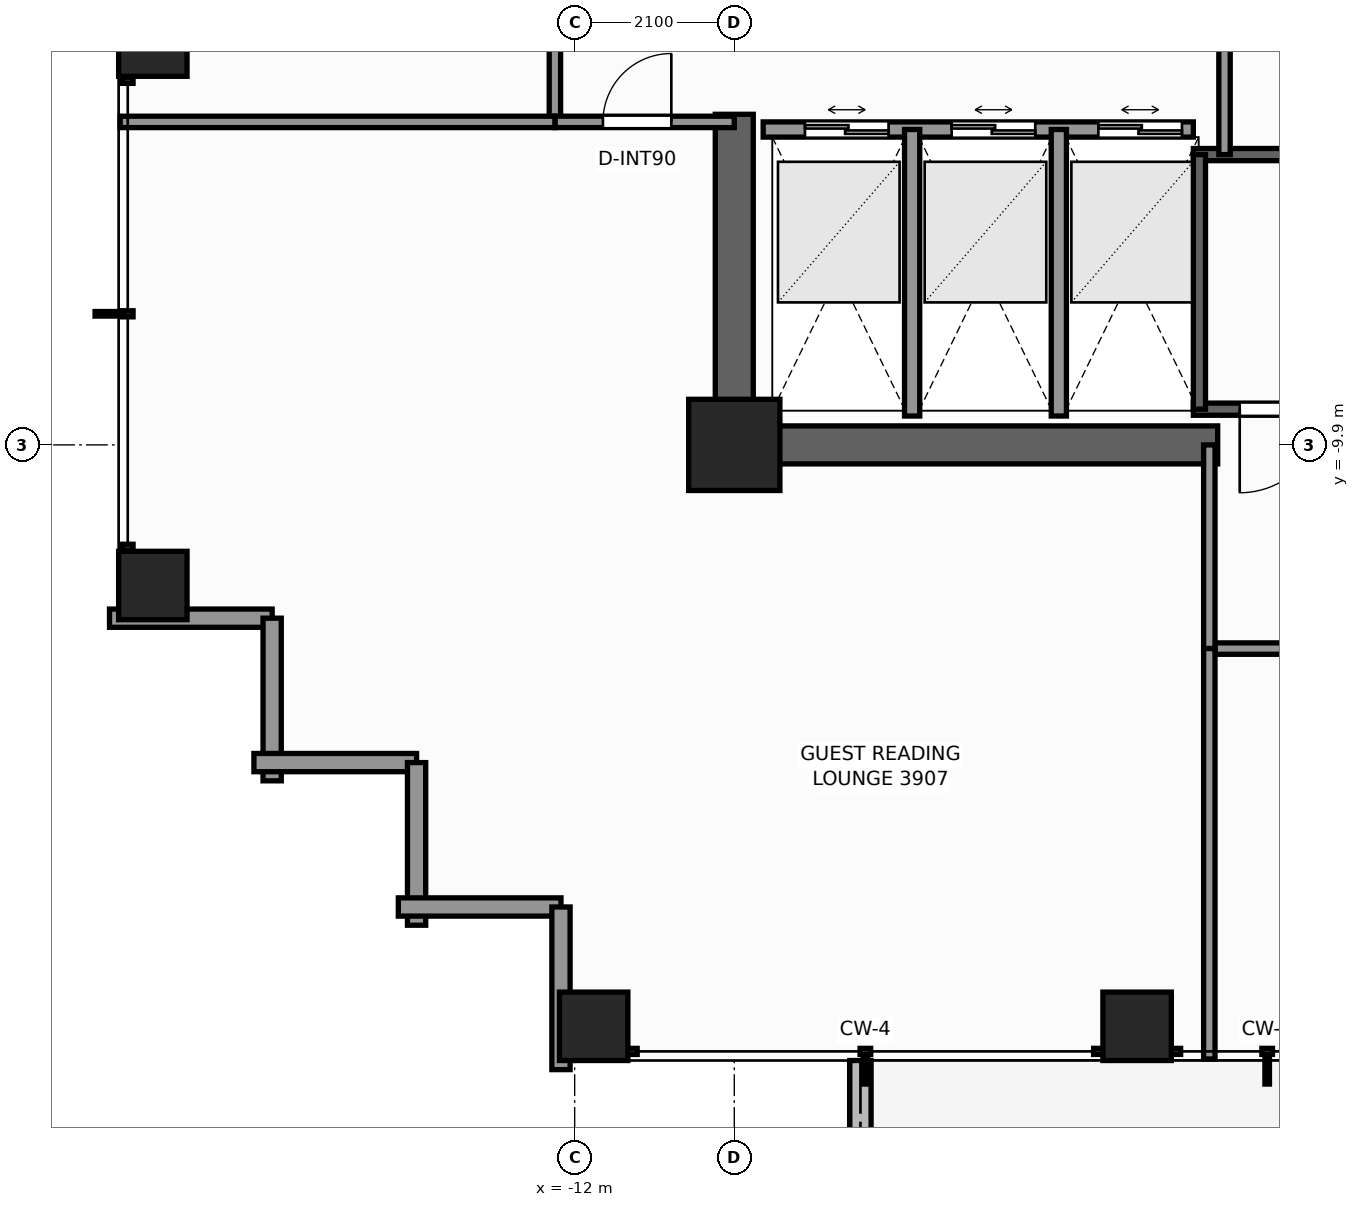
"""IFC4 building model, lengths in metres.
Left out: names, types, materials, properties, quantities, classifications, styles, units other than length and angle.
Written with IfcOpenShell. Run it as: python <this file> out.ifc"""

import sys

from ifc_helpers import new_model, si_unit, direction, frame, frame_2d, origin, origin_2d, place, context, subcontext, project, spatial, rectangle, extrude, element, fill, save


model = new_model("IFC4")
c1 = context("Model", 3, precision=1e-05, world=origin(), true_north=direction((0.0, 1.0)))
c2 = subcontext(c1, "Body", "Model", "MODEL_VIEW")
j1 = project(units=[si_unit("LENGTHUNIT", "METRE"), si_unit("PLANEANGLEUNIT", "RADIAN")], contexts=[c1])
p1 = place(None, origin())
s1 = spatial("IfcSite", under=j1, at=p1, CompositionType="ELEMENT")
p2 = place(p1, origin())
s2 = spatial("IfcBuilding", under=s1, at=p2, CompositionType="ELEMENT")
p3 = place(p2, frame((0.0, 0.0, 134.9)))
s3 = spatial("IfcBuildingStorey", under=s2, at=p3, CompositionType="ELEMENT", Elevation=134.9)
p4 = place(p3, frame((-3.54, -9.9, 0.0), z_axis=(0.0, 0.0, 1.0), x_axis=(-1.0, 0.0, 0.0)))
e1 = element("IfcWall", 1, at=p4, inside=s3, PredefinedType="SHEAR", context=c2, shape_type="SweptSolid", body=[
    extrude(rectangle(XDim=6.61, YDim=0.5, at=frame_2d((3.305, 0.0))), origin(), (0.0, 0.0, 1.0), 3.3),
])
p5 = place(p3, frame((-9.9, -9.65, 0.0), z_axis=(0.0, 0.0, 1.0), x_axis=(0.0, 1.0, 0.0)))
e2 = element("IfcWall", 2, at=p5, inside=s3, PredefinedType="SHEAR", context=c2, shape_type="SweptSolid", body=[
    extrude(rectangle(XDim=4.1, YDim=0.5, at=frame_2d((2.05, 0.0))), origin(), (0.0, 0.0, 1.0), 3.3),
])
p6 = place(p3, frame((-9.9, -9.9, 0.0), z_axis=(0.0, 0.0, 1.0), x_axis=(1.0, 0.0, 0.0)))
e3 = element("IfcColumn", 3, at=p6, inside=s3, PredefinedType="COLUMN", context=c2, shape_type="SweptSolid", body=[
    extrude(rectangle(XDim=1.2, YDim=1.2, at=origin_2d()), origin(), (0.0, 0.0, 1.0), 3.3),
])
for number, where, z_axis, x_axis in (
    (4, (-11.75, -17.55, 0.0), (0.0, 0.0, 1.0), (1.0, 0.0, 0.0)),
    (5, (-4.6, -17.55, 0.0), (0.0, 0.0, 1.0), (1.0, 0.0, 0.0)),
    (6, (-17.55, -11.75, 0.0), (0.0, 0.0, 1.0), (1.0, 0.0, 0.0)),
    (7, (-17.55, -4.6, 0.0), (0.0, 0.0, 1.0), (1.0, 0.0, 0.0)),
):
    element("IfcColumn", number, at=place(p3, frame(where, z_axis=z_axis, x_axis=x_axis)), inside=s3, PredefinedType="COLUMN", context=c2, shape_type="SweptSolid", body=[
        extrude(rectangle(XDim=0.9, YDim=0.9, at=origin_2d()), origin(), (0.0, 0.0, 1.0), 3.3),
    ])
p7 = place(p3, frame((-8.24, -18.0, -0.02), z_axis=(0.0, 0.0, 1.0), x_axis=(0.0, -1.0, 0.0)))
e8 = element("IfcWall", 8, at=p7, inside=s3, PredefinedType="PARAPET", context=c2, shape_type="SweptSolid", body=[
    extrude(rectangle(XDim=1.466, YDim=0.28, at=frame_2d((0.733, 0.0))), origin(), (0.0, 0.0, 1.0), 0.42),
])
for number, where, z_axis, x_axis in (
    (9, (-15.98, -12.18, 0.0), (0.0, 0.0, 1.0), (-1.0, 0.0, 0.0)),
    (10, (-15.98, -14.32, 0.0), (0.0, 0.0, 1.0), (0.0, 1.0, 0.0)),
):
    element("IfcWall", number, at=place(p3, frame(where, z_axis=z_axis, x_axis=x_axis)), inside=s3, PredefinedType="STANDARD", context=c2, shape_type="SweptSolid", body=[
        extrude(rectangle(XDim=2.14, YDim=0.24, at=frame_2d((1.07, 0.0))), origin(), (0.0, 0.0, 1.0), 2.479),
    ])
for number, where, z_axis, x_axis in (
    (11, (-14.08, -14.08, 0.0), (0.0, 0.0, 1.0), (-1.0, 0.0, 0.0)),
    (12, (-14.08, -16.22, 0.0), (0.0, 0.0, 1.0), (0.0, 1.0, 0.0)),
):
    element("IfcWall", number, at=place(p3, frame(where, z_axis=z_axis, x_axis=x_axis)), inside=s3, PredefinedType="STANDARD", context=c2, shape_type="SweptSolid", body=[
        extrude(rectangle(XDim=2.14, YDim=0.24, at=frame_2d((1.07, 0.0))), origin(), (0.0, 0.0, 1.0), 2.479),
    ])
for number, where, z_axis, x_axis in (
    (13, (-12.18, -15.98, 0.0), (0.0, 0.0, 1.0), (-1.0, 0.0, 0.0)),
    (14, (-12.18, -18.12, 0.0), (0.0, 0.0, 1.0), (0.0, 1.0, 0.0)),
):
    element("IfcWall", number, at=place(p3, frame(where, z_axis=z_axis, x_axis=x_axis)), inside=s3, PredefinedType="STANDARD", context=c2, shape_type="SweptSolid", body=[
        extrude(rectangle(XDim=2.14, YDim=0.24, at=frame_2d((1.07, 0.0))), origin(), (0.0, 0.0, 1.0), 2.479),
    ])
p8 = place(p3, frame((3.86, -9.43, 0.0), z_axis=(0.0, 0.0, 1.0), x_axis=(-1.0, 0.0, 0.0)))
e15 = element("IfcWall", 15, at=p8, inside=s3, PredefinedType="SHEAR", context=c2, shape_type="SweptSolid", body=[
    extrude(rectangle(XDim=7.72, YDim=0.16, at=frame_2d((3.86, 0.0))), origin(), (0.0, 0.0, 1.0), 3.3),
])
p9 = place(p8, frame((6.01, 0.0, 0.0)))
e16 = element("IfcOpeningElement", 16, at=p9, cuts=e15, PredefinedType="OPENING", context=c2, shape_type="SweptSolid", body=[
    extrude(rectangle(XDim=1.1, YDim=2.2, at=frame_2d((0.55, 1.1))), frame((0.0, 0.09, 0.0), z_axis=(0.0, -1.0, 0.0), x_axis=(1.0, 0.0, 0.0)), (0.0, 0.0, 1.0), 0.18),
])
p10 = place(p3, frame((-3.86, -6.08, 0.0), z_axis=(0.0, 0.0, 1.0), x_axis=(1.0, 0.0, 0.0)))
e17 = element("IfcWall", 17, at=p10, inside=s3, PredefinedType="SHEAR", context=c2, shape_type="SweptSolid", body=[
    extrude(rectangle(XDim=7.72, YDim=0.16, at=frame_2d((3.86, 0.0))), origin(), (0.0, 0.0, 1.0), 3.3),
])
p11 = place(p3, frame((-3.78, -9.43, 0.0), z_axis=(0.0, 0.0, 1.0), x_axis=(0.0, 1.0, 0.0)))
e18 = element("IfcWall", 18, at=p11, inside=s3, PredefinedType="SHEAR", context=c2, shape_type="SweptSolid", body=[
    extrude(rectangle(XDim=3.35, YDim=0.16, at=frame_2d((1.675, 0.0))), origin(), (0.0, 0.0, 1.0), 3.3),
])
p12 = place(p3, frame((-9.52, -5.75, 0.0), z_axis=(0.0, 0.0, 1.0), x_axis=(1.0, 0.0, 0.0)))
e19 = element("IfcWall", 19, at=p12, inside=s3, PredefinedType="SOLIDWALL", context=c2, shape_type="SweptSolid", body=[
    extrude(rectangle(XDim=5.66, YDim=0.2, at=frame_2d((2.83, 0.0))), origin(), (0.0, 0.0, 1.0), 3.1),
])
p13 = place(p12, frame((0.55, 0.0, 0.0)))
e20 = element("IfcOpeningElement", 20, at=p13, cuts=e19, PredefinedType="OPENING", context=c2, shape_type="SweptSolid", body=[
    extrude(rectangle(XDim=1.1, YDim=2.2, at=frame_2d((0.55, 1.1))), frame((0.0, 0.11, 0.0), z_axis=(0.0, -1.0, 0.0), x_axis=(1.0, 0.0, 0.0)), (0.0, 0.0, 1.0), 0.22),
])
p14 = place(p12, frame((2.48, 0.0, 0.0)))
e21 = element("IfcOpeningElement", 21, at=p14, cuts=e19, PredefinedType="OPENING", context=c2, shape_type="SweptSolid", body=[
    extrude(rectangle(XDim=1.1, YDim=2.2, at=frame_2d((0.55, 1.1))), frame((0.0, 0.11, 0.0), z_axis=(0.0, -1.0, 0.0), x_axis=(1.0, 0.0, 0.0)), (0.0, 0.0, 1.0), 0.22),
])
p15 = place(p12, frame((4.41, 0.0, 0.0)))
e22 = element("IfcOpeningElement", 22, at=p15, cuts=e19, PredefinedType="OPENING", context=c2, shape_type="SweptSolid", body=[
    extrude(rectangle(XDim=1.1, YDim=2.2, at=frame_2d((0.55, 1.1))), frame((0.0, 0.11, 0.0), z_axis=(0.0, -1.0, 0.0), x_axis=(1.0, 0.0, 0.0)), (0.0, 0.0, 1.0), 0.22),
])
for number, where, z_axis, x_axis in (
    (23, (-7.56, -9.52, 0.0), (0.0, 0.0, 1.0), (0.0, 1.0, 0.0)),
    (24, (-5.63, -9.52, 0.0), (0.0, 0.0, 1.0), (0.0, 1.0, 0.0)),
):
    element("IfcWall", number, at=place(p3, frame(where, z_axis=z_axis, x_axis=x_axis)), inside=s3, PredefinedType="SOLIDWALL", context=c2, shape_type="SweptSolid", body=[
        extrude(rectangle(XDim=3.77, YDim=0.2, at=frame_2d((1.885, 0.0))), origin(), (0.0, 0.0, 1.0), 3.1),
    ])
p16 = place(p3, frame((-3.45, -6.08, 0.0), z_axis=(0.0, 0.0, 1.0), x_axis=(0.0, 1.0, 0.0)))
e25 = element("IfcWall", 25, at=p16, inside=s3, PredefinedType="PARTITIONING", context=c2, shape_type="SweptSolid", body=[
    extrude(rectangle(XDim=2.36, YDim=0.15, at=frame_2d((1.18, 0.0))), origin(), (0.0, 0.0, 1.0), 3.1),
])
p17 = place(p3, frame((-3.65, -12.58, 0.0), z_axis=(0.0, 0.0, 1.0), x_axis=(1.0, 0.0, 0.0)))
e26 = element("IfcWall", 26, at=p17, inside=s3, PredefinedType="PARTITIONING", context=c2, shape_type="SweptSolid", body=[
    extrude(rectangle(XDim=16.07, YDim=0.15, at=frame_2d((8.035, 0.0))), origin(), (0.0, 0.0, 1.0), 2.312),
])
p18 = place(p17, frame((10.735, 0.0, 0.0)))
e27 = element("IfcOpeningElement", 27, at=p18, cuts=e26, PredefinedType="OPENING", context=c2, shape_type="SweptSolid", body=[
    extrude(rectangle(XDim=0.9, YDim=2.06, at=frame_2d((0.45, 1.03))), frame((0.0, 0.085, 0.0), z_axis=(0.0, -1.0, 0.0), x_axis=(1.0, 0.0, 0.0)), (0.0, 0.0, 1.0), 0.17),
])
p19 = place(p3, frame((-3.65, -12.58, 0.0), z_axis=(0.0, 0.0, 1.0), x_axis=(0.0, 1.0, 0.0)))
e28 = element("IfcWall", 28, at=p19, inside=s3, PredefinedType="PARTITIONING", context=c2, shape_type="SweptSolid", body=[
    extrude(rectangle(XDim=2.68, YDim=0.15, at=frame_2d((1.34, 0.0))), origin(), (0.0, 0.0, 1.0), 3.1),
])
p20 = place(p3, frame((-12.26, -5.65, 0.0), z_axis=(0.0, 0.0, 1.0), x_axis=(0.0, 1.0, 0.0)))
e29 = element("IfcWall", 29, at=p20, inside=s3, PredefinedType="PARTITIONING", context=c2, shape_type="SweptSolid", body=[
    extrude(rectangle(XDim=3.6, YDim=0.15, at=frame_2d((1.8, 0.0))), origin(), (0.0, 0.0, 1.0), 2.312),
])
p21 = place(p20, frame((2.156, 0.0, 0.0)))
e30 = element("IfcOpeningElement", 30, at=p21, cuts=e29, PredefinedType="OPENING", context=c2, shape_type="SweptSolid", body=[
    extrude(rectangle(XDim=0.9, YDim=2.06, at=frame_2d((0.45, 1.03))), frame((0.0, 0.085, 0.0), z_axis=(0.0, -1.0, 0.0), x_axis=(1.0, 0.0, 0.0)), (0.0, 0.0, 1.0), 0.17),
])
p22 = place(p3, frame((-12.26, -5.65, 0.0), z_axis=(0.0, 0.0, 1.0), x_axis=(1.0, 0.0, 0.0)))
e31 = element("IfcWall", 31, at=p22, inside=s3, PredefinedType="PARTITIONING", context=c2, shape_type="SweptSolid", body=[
    extrude(rectangle(XDim=2.36, YDim=0.15, at=frame_2d((1.18, 0.0))), origin(), (0.0, 0.0, 1.0), 3.1),
])
p23 = place(p22, frame((0.632, 0.0, 0.0)))
e32 = element("IfcOpeningElement", 32, at=p23, cuts=e31, PredefinedType="OPENING", context=c2, shape_type="SweptSolid", body=[
    extrude(rectangle(XDim=0.9, YDim=2.06, at=frame_2d((0.45, 1.03))), frame((0.0, 0.085, 0.0), z_axis=(0.0, -1.0, 0.0), x_axis=(1.0, 0.0, 0.0)), (0.0, 0.0, 1.0), 0.17),
])
p24 = place(p3, frame((-17.98, -5.65, 0.0), z_axis=(0.0, 0.0, 1.0), x_axis=(1.0, 0.0, 0.0)))
e33 = element("IfcWall", 33, at=p24, inside=s3, PredefinedType="PARTITIONING", context=c2, shape_type="SweptSolid", body=[
    extrude(rectangle(XDim=5.72, YDim=0.15, at=frame_2d((2.86, 0.0))), origin(), (0.0, 0.0, 1.0), 2.469),
])
p25 = place(p3, frame((-3.65, -17.98, 0.0), z_axis=(0.0, 0.0, 1.0), x_axis=(0.0, 1.0, 0.0)))
e34 = element("IfcWall", 34, at=p25, inside=s3, PredefinedType="PARTITIONING", context=c2, shape_type="SweptSolid", body=[
    extrude(rectangle(XDim=5.4, YDim=0.15, at=frame_2d((2.7, 0.0))), origin(), (0.0, 0.0, 1.0), 2.469),
])
p26 = place(p9, origin())
e35 = element("IfcDoor", 35, at=p26, inside=s3, OperationType="SINGLE_SWING_RIGHT", PredefinedType="DOOR", context=c2, shape_type="SweptSolid", body=[
    extrude(rectangle(XDim=1.1, YDim=2.2, at=frame_2d((0.55, 1.1))), frame((0.0, 0.025, 0.0), z_axis=(0.0, -1.0, 0.0), x_axis=(1.0, 0.0, 0.0)), (0.0, 0.0, 1.0), 0.05),
])
fill(e16, e35)
p27 = place(p13, origin())
e36 = element("IfcDoor", 36, at=p27, inside=s3, OperationType="DOUBLE_DOOR_SLIDING", PredefinedType="DOOR", context=c2, shape_type="SweptSolid", body=[
    extrude(rectangle(XDim=1.1, YDim=2.2, at=frame_2d((0.55, 1.1))), frame((0.0, 0.025, 0.0), z_axis=(0.0, -1.0, 0.0), x_axis=(1.0, 0.0, 0.0)), (0.0, 0.0, 1.0), 0.05),
])
fill(e20, e36)
p28 = place(p14, origin())
e37 = element("IfcDoor", 37, at=p28, inside=s3, OperationType="DOUBLE_DOOR_SLIDING", PredefinedType="DOOR", context=c2, shape_type="SweptSolid", body=[
    extrude(rectangle(XDim=1.1, YDim=2.2, at=frame_2d((0.55, 1.1))), frame((0.0, 0.025, 0.0), z_axis=(0.0, -1.0, 0.0), x_axis=(1.0, 0.0, 0.0)), (0.0, 0.0, 1.0), 0.05),
])
fill(e21, e37)
p29 = place(p15, origin())
e38 = element("IfcDoor", 38, at=p29, inside=s3, OperationType="DOUBLE_DOOR_SLIDING", PredefinedType="DOOR", context=c2, shape_type="SweptSolid", body=[
    extrude(rectangle(XDim=1.1, YDim=2.2, at=frame_2d((0.55, 1.1))), frame((0.0, 0.025, 0.0), z_axis=(0.0, -1.0, 0.0), x_axis=(1.0, 0.0, 0.0)), (0.0, 0.0, 1.0), 0.05),
])
fill(e22, e38)
p30 = place(p23, origin())
e39 = element("IfcDoor", 39, at=p30, inside=s3, OperationType="SINGLE_SWING_RIGHT", PredefinedType="DOOR", context=c2, shape_type="SweptSolid", body=[
    extrude(rectangle(XDim=0.9, YDim=2.06, at=frame_2d((0.45, 1.03))), frame((0.0, 0.025, 0.0), z_axis=(0.0, -1.0, 0.0), x_axis=(1.0, 0.0, 0.0)), (0.0, 0.0, 1.0), 0.05),
])
fill(e32, e39)
save(model, sys.argv[1])
